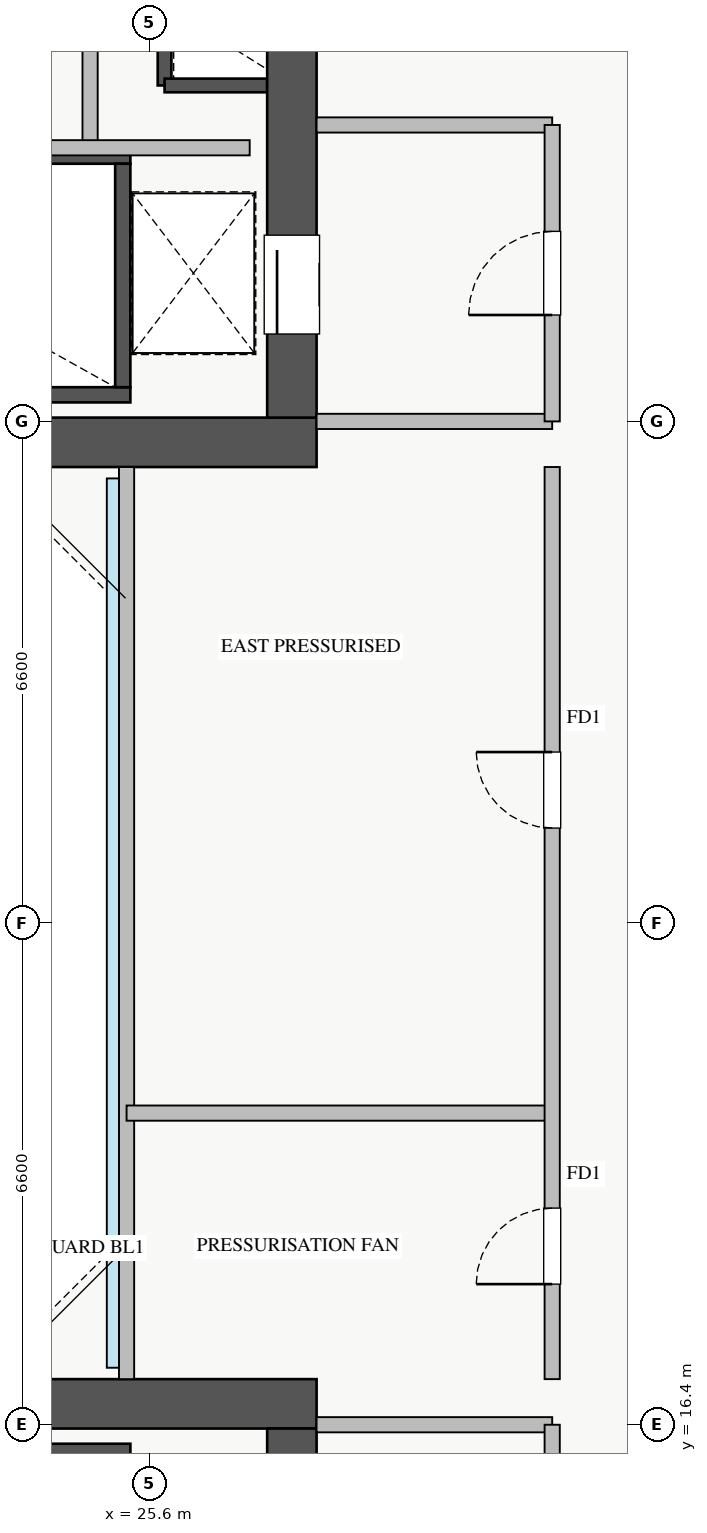
"""IFC4 building model, lengths in metres.
Left out: names, types, materials, properties, quantities, classifications, styles, units other than length and angle.
Written with IfcOpenShell. Run it as: python <this file> out.ifc"""

import sys

from ifc_helpers import new_model, si_unit, direction, frame, frame_2d, origin, place, context, subcontext, project, spatial, rectangle, extrude, source, transform, mapped, element, fill, save


model = new_model("IFC4")
c1 = context("Model", 3, precision=1e-05, world=origin(), true_north=direction((0.0, 1.0)))
c2 = subcontext(c1, "Body", "Model", "MODEL_VIEW")
j1 = project(units=[si_unit("LENGTHUNIT", "METRE"), si_unit("PLANEANGLEUNIT", "RADIAN")], contexts=[c1])
p1 = place(None, origin())
s1 = spatial("IfcSite", under=j1, at=p1, CompositionType="ELEMENT")
p2 = place(p1, origin())
s2 = spatial("IfcBuilding", under=s1, at=p2, CompositionType="ELEMENT")
p3 = place(p2, frame((0.0, 0.0, 186.0)))
s3 = spatial("IfcBuildingStorey", under=s2, at=p3, CompositionType="ELEMENT", Elevation=186.0)
p4 = place(p3, frame((25.8, 34.02, 0.0), z_axis=(0.0, 0.0, 1.0), x_axis=(0.0, 1.0, 0.0)))
e1 = element("IfcWall", 1, at=p4, inside=s3, PredefinedType="SHEAR", context=c2, shape_type="SweptSolid", body=[
    extrude(rectangle(XDim=1.06, YDim=0.18, at=frame_2d((0.53, 0.0))), origin(), (0.0, 0.0, 1.0), 4.32),
])
p5 = place(p3, frame((25.8, 34.02, 0.0), z_axis=(0.0, 0.0, 1.0), x_axis=(1.0, 0.0, 0.0)))
e2 = element("IfcWall", 2, at=p5, inside=s3, PredefinedType="SHEAR", context=c2, shape_type="SweptSolid", body=[
    extrude(rectangle(XDim=1.35, YDim=0.18, at=frame_2d((0.675, 0.0))), origin(), (0.0, 0.0, 1.0), 4.32),
])
p6 = place(p3, frame((18.2, 29.95, 0.0), z_axis=(0.0, 0.0, 1.0), x_axis=(1.0, 0.0, 0.0)))
e3 = element("IfcWall", 3, at=p6, inside=s3, PredefinedType="SHEAR", context=c2, shape_type="SweptSolid", body=[
    extrude(rectangle(XDim=7.15, YDim=0.2, at=frame_2d((3.575, 0.0))), origin(), (0.0, 0.0, 1.0), 4.5),
])
p7 = place(p3, frame((18.2, 33.09, 0.0), z_axis=(0.0, 0.0, 1.0), x_axis=(1.0, 0.0, 0.0)))
e4 = element("IfcWall", 4, at=p7, inside=s3, PredefinedType="SHEAR", context=c2, shape_type="SweptSolid", body=[
    extrude(rectangle(XDim=7.15, YDim=0.2, at=frame_2d((3.575, 0.0))), origin(), (0.0, 0.0, 1.0), 4.5),
])
p8 = place(p7, frame((0.35, 0.0, 0.0)))
e5 = element("IfcOpeningElement", 5, at=p8, cuts=e4, PredefinedType="OPENING", context=c2, shape_type="SweptSolid", body=[
    extrude(rectangle(XDim=1.1, YDim=2.05, at=frame_2d((0.55, 1.025))), frame((0.0, 0.11, 0.0), z_axis=(0.0, -1.0, 0.0), x_axis=(1.0, 0.0, 0.0)), (0.0, 0.0, 1.0), 0.22),
])
p9 = place(p3, frame((25.25, 30.05, 0.0), z_axis=(0.0, 0.0, 1.0), x_axis=(0.0, 1.0, 0.0)))
e6 = element("IfcWall", 6, at=p9, inside=s3, PredefinedType="SHEAR", context=c2, shape_type="SweptSolid", body=[
    extrude(rectangle(XDim=2.94, YDim=0.2, at=frame_2d((1.47, 0.0))), origin(), (0.0, 0.0, 1.0), 4.5),
])
p10 = place(p3, frame((18.2, 16.05, 0.0), z_axis=(0.0, 0.0, 1.0), x_axis=(1.0, 0.0, 0.0)))
e7 = element("IfcWall", 7, at=p10, inside=s3, PredefinedType="SHEAR", context=c2, shape_type="SweptSolid", body=[
    extrude(rectangle(XDim=7.15, YDim=0.2, at=frame_2d((3.575, 0.0))), origin(), (0.0, 0.0, 1.0), 4.5),
])
p11 = place(p3, frame((10.2, 29.325, 0.0), z_axis=(0.0, 0.0, 1.0), x_axis=(1.0, 0.0, 0.0)))
e8 = element("IfcWall", 8, at=p11, inside=s3, PredefinedType="SHEAR", context=c2, shape_type="SweptSolid", body=[
    extrude(rectangle(XDim=17.6, YDim=0.65, at=frame_2d((8.8, 0.0))), origin(), (0.0, 0.0, 1.0), 4.5),
])
p12 = place(p3, frame((27.475, 29.65, 0.0), z_axis=(0.0, 0.0, 1.0), x_axis=(0.0, 1.0, 0.0)))
e9 = element("IfcWall", 9, at=p12, inside=s3, PredefinedType="SHEAR", context=c2, shape_type="SweptSolid", body=[
    extrude(rectangle(XDim=5.9, YDim=0.65, at=frame_2d((2.95, 0.0))), origin(), (0.0, 0.0, 1.0), 4.5),
])
p13 = place(p12, frame((1.1, 0.0, 0.0)))
e10 = element("IfcOpeningElement", 10, at=p13, cuts=e9, PredefinedType="OPENING", context=c2, shape_type="SweptSolid", body=[
    extrude(rectangle(XDim=1.3, YDim=2.05, at=frame_2d((0.65, 1.025))), frame((0.0, 0.335, 0.0), z_axis=(0.0, -1.0, 0.0), x_axis=(1.0, 0.0, 0.0)), (0.0, 0.0, 1.0), 0.67),
])
p14 = place(p3, frame((10.2, 16.675, 0.0), z_axis=(0.0, 0.0, 1.0), x_axis=(1.0, 0.0, 0.0)))
e11 = element("IfcWall", 11, at=p14, inside=s3, PredefinedType="SHEAR", context=c2, shape_type="SweptSolid", body=[
    extrude(rectangle(XDim=17.6, YDim=0.65, at=frame_2d((8.8, 0.0))), origin(), (0.0, 0.0, 1.0), 4.5),
])
p15 = place(p3, frame((27.475, 10.45, 0.0), z_axis=(0.0, 0.0, 1.0), x_axis=(0.0, 1.0, 0.0)))
e12 = element("IfcWall", 12, at=p15, inside=s3, PredefinedType="SHEAR", context=c2, shape_type="SweptSolid", body=[
    extrude(rectangle(XDim=5.9, YDim=0.65, at=frame_2d((2.95, 0.0))), origin(), (0.0, 0.0, 1.0), 4.5),
])
p16 = place(p15, frame((2.1, 0.0, 0.0)))
e13 = element("IfcOpeningElement", 13, at=p16, cuts=e12, PredefinedType="OPENING", context=c2, shape_type="SweptSolid", body=[
    extrude(rectangle(XDim=1.3, YDim=2.05, at=frame_2d((0.65, 1.025))), frame((0.0, 0.335, 0.0), z_axis=(0.0, -1.0, 0.0), x_axis=(1.0, 0.0, 0.0)), (0.0, 0.0, 1.0), 0.67),
])
p17 = place(p3, frame((27.8, 29.6, 0.0), z_axis=(0.0, 0.0, 1.0), x_axis=(1.0, 0.0, 0.0)))
e14 = element("IfcWall", 14, at=p17, inside=s3, PredefinedType="PARTITIONING", context=c2, shape_type="SweptSolid", body=[
    extrude(rectangle(XDim=3.1, YDim=0.2, at=frame_2d((1.55, 0.0))), origin(), (0.0, 0.0, 1.0), 4.32),
])
p18 = place(p3, frame((27.8, 33.5, 0.0), z_axis=(0.0, 0.0, 1.0), x_axis=(1.0, 0.0, 0.0)))
e15 = element("IfcWall", 15, at=p18, inside=s3, PredefinedType="PARTITIONING", context=c2, shape_type="SweptSolid", body=[
    extrude(rectangle(XDim=3.1, YDim=0.2, at=frame_2d((1.55, 0.0))), origin(), (0.0, 0.0, 1.0), 3.465),
])
p19 = place(p3, frame((30.9, 29.6, 0.0), z_axis=(0.0, 0.0, 1.0), x_axis=(0.0, 1.0, 0.0)))
e16 = element("IfcWall", 16, at=p19, inside=s3, PredefinedType="PARTITIONING", context=c2, shape_type="SweptSolid", body=[
    extrude(rectangle(XDim=3.9, YDim=0.2, at=frame_2d((1.95, 0.0))), origin(), (0.0, 0.0, 1.0), 4.32),
])
p20 = place(p19, frame((1.4, 0.0, 0.0)))
e17 = element("IfcOpeningElement", 17, at=p20, cuts=e16, PredefinedType="OPENING", context=c2, shape_type="SweptSolid", body=[
    extrude(rectangle(XDim=1.1, YDim=2.05, at=frame_2d((0.55, 1.025))), frame((0.0, 0.11, 0.0), z_axis=(0.0, -1.0, 0.0), x_axis=(1.0, 0.0, 0.0)), (0.0, 0.0, 1.0), 0.22),
])
p21 = place(p3, frame((27.8, 16.4, 0.0), z_axis=(0.0, 0.0, 1.0), x_axis=(1.0, 0.0, 0.0)))
e18 = element("IfcWall", 18, at=p21, inside=s3, PredefinedType="PARTITIONING", context=c2, shape_type="SweptSolid", body=[
    extrude(rectangle(XDim=3.1, YDim=0.2, at=frame_2d((1.55, 0.0))), origin(), (0.0, 0.0, 1.0), 4.32),
])
p22 = place(p3, frame((30.9, 12.5, 0.0), z_axis=(0.0, 0.0, 1.0), x_axis=(0.0, 1.0, 0.0)))
e19 = element("IfcWall", 19, at=p22, inside=s3, PredefinedType="PARTITIONING", context=c2, shape_type="SweptSolid", body=[
    extrude(rectangle(XDim=3.9, YDim=0.2, at=frame_2d((1.95, 0.0))), origin(), (0.0, 0.0, 1.0), 4.32),
])
p23 = place(p22, frame((1.4, 0.0, 0.0)))
e20 = element("IfcOpeningElement", 20, at=p23, cuts=e19, PredefinedType="OPENING", context=c2, shape_type="SweptSolid", body=[
    extrude(rectangle(XDim=1.1, YDim=2.05, at=frame_2d((0.55, 1.025))), frame((0.0, 0.11, 0.0), z_axis=(0.0, -1.0, 0.0), x_axis=(1.0, 0.0, 0.0)), (0.0, 0.0, 1.0), 0.22),
])
p24 = place(p3, frame((24.82, 33.2, 0.0), z_axis=(0.0, 0.0, 1.0), x_axis=(0.0, 1.0, 0.0)))
e21 = element("IfcWall", 21, at=p24, inside=s3, PredefinedType="PARTITIONING", context=c2, shape_type="SweptSolid", body=[
    extrude(rectangle(XDim=2.65, YDim=0.2, at=frame_2d((1.325, 0.0))), origin(), (0.0, 0.0, 1.0), 4.32),
])
p25 = place(p3, frame((21.75, 33.2, 0.0), z_axis=(0.0, 0.0, 1.0), x_axis=(1.0, 0.0, 0.0)))
e22 = element("IfcWall", 22, at=p25, inside=s3, PredefinedType="PARTITIONING", context=c2, shape_type="SweptSolid", body=[
    extrude(rectangle(XDim=5.17, YDim=0.2, at=frame_2d((2.585, 0.0))), origin(), (0.0, 0.0, 1.0), 4.32),
])
p26 = place(p3, frame((25.3, 17.0, 0.0), z_axis=(0.0, 0.0, 1.0), x_axis=(0.0, 1.0, 0.0)))
e23 = element("IfcWall", 23, at=p26, inside=s3, PredefinedType="PARTITIONING", context=c2, shape_type="SweptSolid", body=[
    extrude(rectangle(XDim=12.0, YDim=0.2, at=frame_2d((6.0, 0.0))), origin(), (0.0, 0.0, 1.0), 2.515),
])
p27 = place(p3, frame((25.3, 20.5, 0.0), z_axis=(0.0, 0.0, 1.0), x_axis=(1.0, 0.0, 0.0)))
e24 = element("IfcWall", 24, at=p27, inside=s3, PredefinedType="PARTITIONING", context=c2, shape_type="SweptSolid", body=[
    extrude(rectangle(XDim=5.6, YDim=0.2, at=frame_2d((2.8, 0.0))), origin(), (0.0, 0.0, 1.0), 4.32),
])
p28 = place(p3, frame((30.9, 17.0, 0.0), z_axis=(0.0, 0.0, 1.0), x_axis=(0.0, 1.0, 0.0)))
e25 = element("IfcWall", 25, at=p28, inside=s3, PredefinedType="PARTITIONING", context=c2, shape_type="SweptSolid", body=[
    extrude(rectangle(XDim=12.0, YDim=0.2, at=frame_2d((6.0, 0.0))), origin(), (0.0, 0.0, 1.0), 4.32),
])
p29 = place(p28, frame((1.25, 0.0, 0.0)))
e26 = element("IfcOpeningElement", 26, at=p29, cuts=e25, PredefinedType="OPENING", context=c2, shape_type="SweptSolid", body=[
    extrude(rectangle(XDim=1.0, YDim=2.05, at=frame_2d((0.5, 1.025))), frame((0.0, 0.11, 0.0), z_axis=(0.0, -1.0, 0.0), x_axis=(1.0, 0.0, 0.0)), (0.0, 0.0, 1.0), 0.22),
])
p30 = place(p28, frame((7.25, 0.0, 0.0)))
e27 = element("IfcOpeningElement", 27, at=p30, cuts=e25, PredefinedType="OPENING", context=c2, shape_type="SweptSolid", body=[
    extrude(rectangle(XDim=1.0, YDim=2.05, at=frame_2d((0.5, 1.025))), frame((0.0, 0.11, 0.0), z_axis=(0.0, -1.0, 0.0), x_axis=(1.0, 0.0, 0.0)), (0.0, 0.0, 1.0), 0.22),
])
m1 = source(origin(), c2, "Body", "SweptSolid", [
    extrude(rectangle(XDim=1.3, YDim=2.05, at=frame_2d((0.65, 1.025))), frame((0.0, 0.025, 0.0), z_axis=(0.0, -1.0, 0.0), x_axis=(1.0, 0.0, 0.0)), (0.0, 0.0, 1.0), 0.05),
])
p31 = place(p13, origin())
e28 = element("IfcDoor", 28, at=p31, inside=s3, OperationType="SLIDING_TO_LEFT", PredefinedType="DOOR", context=c2, shape_type="MappedRepresentation", body=[
    mapped(m1, transform((0.0, 0.0, 0.0), x_axis=(1.0, 0.0, 0.0), y_axis=(0.0, 1.0, 0.0), z_axis=(0.0, 0.0, 1.0), scale=1.0)),
])
fill(e10, e28)
m2 = source(origin(), c2, "Body", "SweptSolid", [
    extrude(rectangle(XDim=1.1, YDim=2.05, at=frame_2d((0.55, 1.025))), frame((0.0, 0.025, 0.0), z_axis=(0.0, -1.0, 0.0), x_axis=(1.0, 0.0, 0.0)), (0.0, 0.0, 1.0), 0.05),
])
p32 = place(p20, origin())
e29 = element("IfcDoor", 29, at=p32, inside=s3, OperationType="SINGLE_SWING_LEFT", PredefinedType="DOOR", context=c2, shape_type="MappedRepresentation", body=[
    mapped(m2, transform((0.0, 0.0, 0.0), x_axis=(1.0, 0.0, 0.0), y_axis=(0.0, 1.0, 0.0), z_axis=(0.0, 0.0, 1.0), scale=1.0)),
])
fill(e17, e29)
m3 = source(origin(), c2, "Body", "SweptSolid", [
    extrude(rectangle(XDim=1.0, YDim=2.05, at=frame_2d((0.5, 1.025))), frame((0.0, 0.025, 0.0), z_axis=(0.0, -1.0, 0.0), x_axis=(1.0, 0.0, 0.0)), (0.0, 0.0, 1.0), 0.05),
])
p33 = place(p29, origin())
e30 = element("IfcDoor", 30, at=p33, inside=s3, OperationType="SINGLE_SWING_LEFT", PredefinedType="DOOR", context=c2, shape_type="MappedRepresentation", body=[
    mapped(m3, transform((0.0, 0.0, 0.0), x_axis=(1.0, 0.0, 0.0), y_axis=(0.0, 1.0, 0.0), z_axis=(0.0, 0.0, 1.0), scale=1.0)),
])
fill(e26, e30)
p34 = place(p30, origin())
e31 = element("IfcDoor", 31, at=p34, inside=s3, OperationType="SINGLE_SWING_RIGHT", PredefinedType="DOOR", context=c2, shape_type="MappedRepresentation", body=[
    mapped(m3, transform((0.0, 0.0, 0.0), x_axis=(1.0, 0.0, 0.0), y_axis=(0.0, 1.0, 0.0), z_axis=(0.0, 0.0, 1.0), scale=1.0)),
])
fill(e27, e31)
save(model, sys.argv[1])
